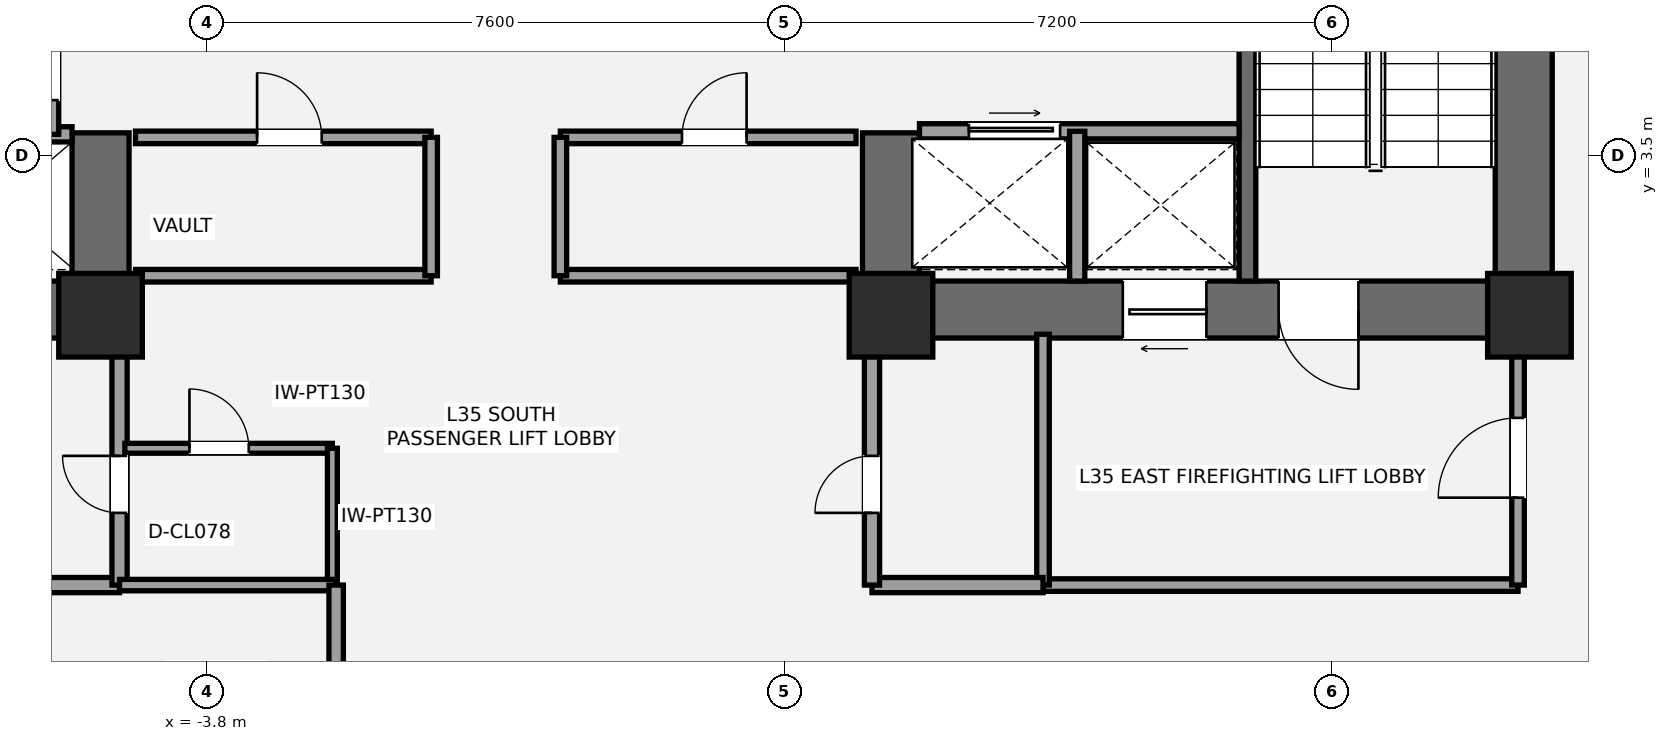
"""IFC4 building model, lengths in metres.
Left out: names, types, materials, properties, quantities, classifications, styles, units other than length and angle.
Written with IfcOpenShell. Run it as: python <this file> out.ifc"""

import sys

from ifc_helpers import new_model, si_unit, direction, frame, frame_2d, origin, origin_2d, place, context, subcontext, project, spatial, rectangle, extrude, element, fill, save


model = new_model("IFC4")
c1 = context("Model", 3, precision=1e-05, world=origin(), true_north=direction((0.0, 1.0)))
c2 = subcontext(c1, "Body", "Model", "MODEL_VIEW")
j1 = project(units=[si_unit("LENGTHUNIT", "METRE"), si_unit("PLANEANGLEUNIT", "RADIAN")], contexts=[c1])
p1 = place(None, origin())
s1 = spatial("IfcSite", under=j1, at=p1, CompositionType="ELEMENT")
p2 = place(p1, origin())
s2 = spatial("IfcBuilding", under=s1, at=p2, CompositionType="ELEMENT")
p3 = place(p2, frame((0.0, 0.0, 131.6)))
s3 = spatial("IfcBuildingStorey", under=s2, at=p3, CompositionType="ELEMENT", Elevation=131.6)
p4 = place(p3, frame((-4.825, 1.475, 0.0), z_axis=(0.0, 0.0, 1.0), x_axis=(-1.0, 0.0, 0.0)))
e1 = element("IfcWall", 1, at=p4, inside=s3, PredefinedType="SHEAR", context=c2, shape_type="SweptSolid", body=[
    extrude(rectangle(XDim=9.075, YDim=0.75, at=frame_2d((4.538, 0.0))), origin(), (0.0, 0.0, 1.0), 3.5),
])
p5 = place(p4, frame((5.475, 0.0, 0.0)))
e2 = element("IfcOpeningElement", 2, at=p5, cuts=e1, PredefinedType="OPENING", context=c2, shape_type="SweptSolid", body=[
    extrude(rectangle(XDim=1.05, YDim=2.15, at=frame_2d((0.525, 1.075))), frame((0.0, 0.385, 0.0), z_axis=(0.0, -1.0, 0.0), x_axis=(1.0, 0.0, 0.0)), (0.0, 0.0, 1.0), 0.77),
])
p6 = place(p4, frame((3.805, 0.0, 0.0)))
e3 = element("IfcOpeningElement", 3, at=p6, cuts=e1, PredefinedType="OPENING", context=c2, shape_type="SweptSolid", body=[
    extrude(rectangle(XDim=1.1, YDim=2.2, at=frame_2d((0.55, 1.1))), frame((0.0, 0.385, 0.0), z_axis=(0.0, -1.0, 0.0), x_axis=(1.0, 0.0, 0.0)), (0.0, 0.0, 1.0), 0.77),
])
p7 = place(p3, frame((-5.2, 1.1, 0.0), z_axis=(0.0, 0.0, 1.0), x_axis=(0.0, 1.0, 0.0)))
e4 = element("IfcWall", 4, at=p7, inside=s3, PredefinedType="SHEAR", context=c2, shape_type="SweptSolid", body=[
    extrude(rectangle(XDim=2.7, YDim=0.75, at=frame_2d((1.35, 0.0))), origin(), (0.0, 0.0, 1.0), 3.5),
])
p8 = place(p3, frame((13.525, 1.1, 0.0), z_axis=(0.0, 0.0, 1.0), x_axis=(0.0, 1.0, 0.0)))
e5 = element("IfcWall", 5, at=p8, inside=s3, PredefinedType="SHEAR", context=c2, shape_type="SweptSolid", body=[
    extrude(rectangle(XDim=8.65, YDim=0.75, at=frame_2d((4.325, 0.0))), origin(), (0.0, 0.0, 1.0), 3.5),
])
p9 = place(p3, frame((13.9, 1.475, 0.0), z_axis=(0.0, 0.0, 1.0), x_axis=(-1.0, 0.0, 0.0)))
e6 = element("IfcWall", 6, at=p9, inside=s3, PredefinedType="SHEAR", context=c2, shape_type="SweptSolid", body=[
    extrude(rectangle(XDim=9.075, YDim=0.75, at=frame_2d((4.538, 0.0))), origin(), (0.0, 0.0, 1.0), 3.5),
])
p10 = place(p9, frame((2.55, 0.0, 0.0)))
e7 = element("IfcOpeningElement", 7, at=p10, cuts=e6, PredefinedType="OPENING", context=c2, shape_type="SweptSolid", body=[
    extrude(rectangle(XDim=1.05, YDim=2.15, at=frame_2d((0.525, 1.075))), frame((0.0, 0.385, 0.0), z_axis=(0.0, -1.0, 0.0), x_axis=(1.0, 0.0, 0.0)), (0.0, 0.0, 1.0), 0.77),
])
p11 = place(p9, frame((4.55, 0.0, 0.0)))
e8 = element("IfcOpeningElement", 8, at=p11, cuts=e6, PredefinedType="OPENING", context=c2, shape_type="SweptSolid", body=[
    extrude(rectangle(XDim=1.1, YDim=2.2, at=frame_2d((0.55, 1.1))), frame((0.0, 0.385, 0.0), z_axis=(0.0, -1.0, 0.0), x_axis=(1.0, 0.0, 0.0)), (0.0, 0.0, 1.0), 0.77),
])
p12 = place(p3, frame((5.2, 1.1, 0.0), z_axis=(0.0, 0.0, 1.0), x_axis=(0.0, 1.0, 0.0)))
e9 = element("IfcWall", 9, at=p12, inside=s3, PredefinedType="SHEAR", context=c2, shape_type="SweptSolid", body=[
    extrude(rectangle(XDim=2.7, YDim=0.75, at=frame_2d((1.35, 0.0))), origin(), (0.0, 0.0, 1.0), 3.5),
])
p13 = place(p3, frame((9.89, 1.85, 0.0), z_axis=(0.0, 0.0, 1.0), x_axis=(0.0, 1.0, 0.0)))
e10 = element("IfcWall", 10, at=p13, inside=s3, PredefinedType="SHEAR", context=c2, shape_type="SweptSolid", body=[
    extrude(rectangle(XDim=7.15, YDim=0.22, at=frame_2d((3.575, 0.0))), origin(), (0.0, 0.0, 1.0), 3.5),
])
for number, where, z_axis, x_axis in (
    (11, (-5.2, 1.4, 0.0), (0.0, 0.0, 1.0), (1.0, 0.0, 0.0)),
    (12, (5.2, 1.4, 0.0), (0.0, 0.0, 1.0), (1.0, 0.0, 0.0)),
    (13, (13.6, 1.4, 0.0), (0.0, 0.0, 1.0), (1.0, 0.0, 0.0)),
):
    element("IfcColumn", number, at=place(p3, frame(where, z_axis=z_axis, x_axis=x_axis)), inside=s3, PredefinedType="COLUMN", context=c2, shape_type="SweptSolid", body=[
        extrude(rectangle(XDim=1.1, YDim=1.1, at=origin_2d()), origin(), (0.0, 0.0, 1.0), 3.5),
    ])
p14 = place(p3, frame((-7.2, -2.15, 0.0), z_axis=(0.0, 0.0, 1.0), x_axis=(1.0, 0.0, 0.0)))
e14 = element("IfcWall", 14, at=p14, inside=s3, PredefinedType="SOLIDWALL", context=c2, shape_type="SweptSolid", body=[
    extrude(rectangle(XDim=2.25, YDim=0.2, at=frame_2d((1.125, 0.0))), origin(), (0.0, 0.0, 1.0), 3.26),
])
p15 = place(p3, frame((-4.95, -2.15, 0.0), z_axis=(0.0, 0.0, 1.0), x_axis=(0.0, 1.0, 0.0)))
e15 = element("IfcWall", 15, at=p15, inside=s3, PredefinedType="SOLIDWALL", context=c2, shape_type="SweptSolid", body=[
    extrude(rectangle(XDim=3.3, YDim=0.2, at=frame_2d((1.65, 0.0))), origin(), (0.0, 0.0, 1.0), 2.713),
])
p16 = place(p15, frame((0.95, 0.0, 0.0)))
e16 = element("IfcOpeningElement", 16, at=p16, cuts=e15, PredefinedType="OPENING", context=c2, shape_type="SweptSolid", body=[
    extrude(rectangle(XDim=0.75, YDim=2.1, at=frame_2d((0.375, 1.05))), frame((0.0, 0.11, 0.0), z_axis=(0.0, -1.0, 0.0), x_axis=(1.0, 0.0, 0.0)), (0.0, 0.0, 1.0), 0.22),
])
p17 = place(p3, frame((7.2, -2.15, 0.0), z_axis=(0.0, 0.0, 1.0), x_axis=(1.0, 0.0, 0.0)))
e17 = element("IfcWall", 17, at=p17, inside=s3, PredefinedType="PARTITIONING", context=c2, shape_type="SweptSolid", body=[
    extrude(rectangle(XDim=6.25, YDim=0.165, at=frame_2d((3.125, 0.0))), origin(), (0.0, 0.0, 1.0), 3.26),
])
p18 = place(p3, frame((7.2, -2.15, 0.0), z_axis=(0.0, 0.0, 1.0), x_axis=(0.0, 1.0, 0.0)))
e18 = element("IfcWall", 18, at=p18, inside=s3, PredefinedType="PARTITIONING", context=c2, shape_type="SweptSolid", body=[
    extrude(rectangle(XDim=3.3, YDim=0.165, at=frame_2d((1.65, 0.0))), origin(), (0.0, 0.0, 1.0), 3.26),
])
p19 = place(p3, frame((13.45, -2.15, 0.0), z_axis=(0.0, 0.0, 1.0), x_axis=(0.0, 1.0, 0.0)))
e19 = element("IfcWall", 19, at=p19, inside=s3, PredefinedType="PARTITIONING", context=c2, shape_type="SweptSolid", body=[
    extrude(rectangle(XDim=3.3, YDim=0.165, at=frame_2d((1.65, 0.0))), origin(), (0.0, 0.0, 1.0), 2.713),
])
p20 = place(p19, frame((1.15, 0.0, 0.0)))
e20 = element("IfcOpeningElement", 20, at=p20, cuts=e19, PredefinedType="OPENING", context=c2, shape_type="SweptSolid", body=[
    extrude(rectangle(XDim=1.05, YDim=2.15, at=frame_2d((0.525, 1.075))), frame((0.0, 0.093, 0.0), z_axis=(0.0, -1.0, 0.0), x_axis=(1.0, 0.0, 0.0)), (0.0, 0.0, 1.0), 0.185),
])
p21 = place(p3, frame((4.95, -2.15, 0.0), z_axis=(0.0, 0.0, 1.0), x_axis=(1.0, 0.0, 0.0)))
e21 = element("IfcWall", 21, at=p21, inside=s3, PredefinedType="SOLIDWALL", context=c2, shape_type="SweptSolid", body=[
    extrude(rectangle(XDim=2.25, YDim=0.2, at=frame_2d((1.125, 0.0))), origin(), (0.0, 0.0, 1.0), 3.26),
])
p22 = place(p3, frame((4.95, -2.15, 0.0), z_axis=(0.0, 0.0, 1.0), x_axis=(0.0, 1.0, 0.0)))
e22 = element("IfcWall", 22, at=p22, inside=s3, PredefinedType="SOLIDWALL", context=c2, shape_type="SweptSolid", body=[
    extrude(rectangle(XDim=3.3, YDim=0.2, at=frame_2d((1.65, 0.0))), origin(), (0.0, 0.0, 1.0), 3.26),
])
p23 = place(p22, frame((0.95, 0.0, 0.0)))
e23 = element("IfcOpeningElement", 23, at=p23, cuts=e22, PredefinedType="OPENING", context=c2, shape_type="SweptSolid", body=[
    extrude(rectangle(XDim=0.75, YDim=2.1, at=frame_2d((0.375, 1.05))), frame((0.0, 0.11, 0.0), z_axis=(0.0, -1.0, 0.0), x_axis=(1.0, 0.0, 0.0)), (0.0, 0.0, 1.0), 0.22),
])
p24 = place(p3, frame((-4.88, -0.35, 0.0), z_axis=(0.0, 0.0, 1.0), x_axis=(1.0, 0.0, 0.0)))
e24 = element("IfcWall", 24, at=p24, inside=s3, PredefinedType="PARTITIONING", context=c2, shape_type="SweptSolid", body=[
    extrude(rectangle(XDim=2.73, YDim=0.13, at=frame_2d((1.365, 0.0))), origin(), (0.0, 0.0, 1.0), 3.26),
])
p25 = place(p24, frame((0.85, 0.0, 0.0)))
e25 = element("IfcOpeningElement", 25, at=p25, cuts=e24, PredefinedType="OPENING", context=c2, shape_type="SweptSolid", body=[
    extrude(rectangle(XDim=0.78, YDim=2.1, at=frame_2d((0.39, 1.05))), frame((0.0, 0.075, 0.0), z_axis=(0.0, -1.0, 0.0), x_axis=(1.0, 0.0, 0.0)), (0.0, 0.0, 1.0), 0.15),
])
p26 = place(p3, frame((-2.15, -2.15, 0.0), z_axis=(0.0, 0.0, 1.0), x_axis=(0.0, 1.0, 0.0)))
e26 = element("IfcWall", 26, at=p26, inside=s3, PredefinedType="PARTITIONING", context=c2, shape_type="SweptSolid", body=[
    extrude(rectangle(XDim=1.8, YDim=0.13, at=frame_2d((0.9, 0.0))), origin(), (0.0, 0.0, 1.0), 2.713),
])
p27 = place(p3, frame((-9.78, 3.78, 0.0), z_axis=(0.0, 0.0, 1.0), x_axis=(1.0, 0.0, 0.0)))
e27 = element("IfcWall", 27, at=p27, inside=s3, PredefinedType="SOLIDWALL", context=c2, shape_type="SweptSolid", body=[
    extrude(rectangle(XDim=4.205, YDim=0.2, at=frame_2d((2.103, 0.0))), origin(), (0.0, 0.0, 1.0), 3.26),
])
p28 = place(p3, frame((-5.85, 3.78, 0.0), z_axis=(0.0, 0.0, 1.0), x_axis=(0.0, 1.0, 0.0)))
e28 = element("IfcWall", 28, at=p28, inside=s3, PredefinedType="SOLIDWALL", context=c2, shape_type="SweptSolid", body=[
    extrude(rectangle(XDim=1.69, YDim=0.2, at=frame_2d((0.845, 0.0))), origin(), (0.0, 0.0, 1.0), 3.26),
])
p29 = place(p28, frame((0.45, 0.0, 0.0)))
e29 = element("IfcOpeningElement", 29, at=p29, cuts=e28, PredefinedType="OPENING", context=c2, shape_type="SweptSolid", body=[
    extrude(rectangle(XDim=0.75, YDim=2.1, at=frame_2d((0.375, 1.05))), frame((0.0, 0.11, 0.0), z_axis=(0.0, -1.0, 0.0), x_axis=(1.0, 0.0, 0.0)), (0.0, 0.0, 1.0), 0.22),
])
p30 = place(p3, frame((5.575, 3.82, 0.0), z_axis=(0.0, 0.0, 1.0), x_axis=(1.0, 0.0, 0.0)))
e30 = element("IfcWall", 30, at=p30, inside=s3, PredefinedType="SOLIDWALL", context=c2, shape_type="SweptSolid", body=[
    extrude(rectangle(XDim=4.205, YDim=0.2, at=frame_2d((2.103, 0.0))), origin(), (0.0, 0.0, 1.0), 3.26),
])
p31 = place(p30, frame((0.65, 0.0, 0.0)))
e31 = element("IfcOpeningElement", 31, at=p31, cuts=e30, PredefinedType="OPENING", context=c2, shape_type="SweptSolid", body=[
    extrude(rectangle(XDim=1.2, YDim=2.2, at=frame_2d((0.6, 1.1))), frame((0.0, 0.11, 0.0), z_axis=(0.0, -1.0, 0.0), x_axis=(1.0, 0.0, 0.0)), (0.0, 0.0, 1.0), 0.22),
])
p32 = place(p3, frame((7.65, 1.85, 0.0), z_axis=(0.0, 0.0, 1.0), x_axis=(0.0, 1.0, 0.0)))
e32 = element("IfcWall", 32, at=p32, inside=s3, PredefinedType="SOLIDWALL", context=c2, shape_type="SweptSolid", body=[
    extrude(rectangle(XDim=1.97, YDim=0.2, at=frame_2d((0.985, 0.0))), origin(), (0.0, 0.0, 1.0), 3.26),
])
p33 = place(p3, frame((-4.74, 1.92, 0.0), z_axis=(0.0, 0.0, 1.0), x_axis=(1.0, 0.0, 0.0)))
e33 = element("IfcWall", 33, at=p33, inside=s3, PredefinedType="PARTITIONING", context=c2, shape_type="SweptSolid", body=[
    extrude(rectangle(XDim=3.89, YDim=0.165, at=frame_2d((1.945, 0.0))), origin(), (0.0, 0.0, 1.0), 2.25),
])
p34 = place(p3, frame((-4.74, 3.74, 0.0), z_axis=(0.0, 0.0, 1.0), x_axis=(1.0, 0.0, 0.0)))
e34 = element("IfcWall", 34, at=p34, inside=s3, PredefinedType="PARTITIONING", context=c2, shape_type="SweptSolid", body=[
    extrude(rectangle(XDim=3.89, YDim=0.165, at=frame_2d((1.945, 0.0))), origin(), (0.0, 0.0, 1.0), 3.26),
])
p35 = place(p34, frame((1.6, 0.0, 0.0)))
e35 = element("IfcOpeningElement", 35, at=p35, cuts=e34, PredefinedType="OPENING", context=c2, shape_type="SweptSolid", body=[
    extrude(rectangle(XDim=0.85, YDim=2.1, at=frame_2d((0.425, 1.05))), frame((0.0, 0.093, 0.0), z_axis=(0.0, -1.0, 0.0), x_axis=(1.0, 0.0, 0.0)), (0.0, 0.0, 1.0), 0.185),
])
p36 = place(p3, frame((-0.85, 1.92, 0.0), z_axis=(0.0, 0.0, 1.0), x_axis=(0.0, 1.0, 0.0)))
e36 = element("IfcWall", 36, at=p36, inside=s3, PredefinedType="PARTITIONING", context=c2, shape_type="SweptSolid", body=[
    extrude(rectangle(XDim=1.82, YDim=0.165, at=frame_2d((0.91, 0.0))), origin(), (0.0, 0.0, 1.0), 3.26),
])
p37 = place(p3, frame((0.85, 1.92, 0.0), z_axis=(0.0, 0.0, 1.0), x_axis=(1.0, 0.0, 0.0)))
e37 = element("IfcWall", 37, at=p37, inside=s3, PredefinedType="PARTITIONING", context=c2, shape_type="SweptSolid", body=[
    extrude(rectangle(XDim=3.89, YDim=0.165, at=frame_2d((1.945, 0.0))), origin(), (0.0, 0.0, 1.0), 2.25),
])
p38 = place(p3, frame((0.85, 3.74, 0.0), z_axis=(0.0, 0.0, 1.0), x_axis=(1.0, 0.0, 0.0)))
e38 = element("IfcWall", 38, at=p38, inside=s3, PredefinedType="PARTITIONING", context=c2, shape_type="SweptSolid", body=[
    extrude(rectangle(XDim=3.89, YDim=0.165, at=frame_2d((1.945, 0.0))), origin(), (0.0, 0.0, 1.0), 3.26),
])
p39 = place(p38, frame((1.6, 0.0, 0.0)))
e39 = element("IfcOpeningElement", 39, at=p39, cuts=e38, PredefinedType="OPENING", context=c2, shape_type="SweptSolid", body=[
    extrude(rectangle(XDim=0.85, YDim=2.1, at=frame_2d((0.425, 1.05))), frame((0.0, 0.093, 0.0), z_axis=(0.0, -1.0, 0.0), x_axis=(1.0, 0.0, 0.0)), (0.0, 0.0, 1.0), 0.185),
])
p40 = place(p3, frame((0.85, 1.92, 0.0), z_axis=(0.0, 0.0, 1.0), x_axis=(0.0, 1.0, 0.0)))
e40 = element("IfcWall", 40, at=p40, inside=s3, PredefinedType="PARTITIONING", context=c2, shape_type="SweptSolid", body=[
    extrude(rectangle(XDim=1.82, YDim=0.165, at=frame_2d((0.91, 0.0))), origin(), (0.0, 0.0, 1.0), 3.26),
])
p41 = place(p3, frame((-4.95, -2.15, 0.0), z_axis=(0.0, 0.0, 1.0), x_axis=(1.0, 0.0, 0.0)))
e41 = element("IfcWall", 41, at=p41, inside=s3, PredefinedType="PLUMBINGWALL", context=c2, shape_type="SweptSolid", body=[
    extrude(rectangle(XDim=2.85, YDim=0.15, at=frame_2d((1.425, 0.0))), origin(), (0.0, 0.0, 1.0), 2.713),
])
p42 = place(p3, frame((-2.1, -4.05, 0.0), z_axis=(0.0, 0.0, 1.0), x_axis=(0.0, 1.0, 0.0)))
e42 = element("IfcWall", 42, at=p42, inside=s3, PredefinedType="PLUMBINGWALL", context=c2, shape_type="SweptSolid", body=[
    extrude(rectangle(XDim=1.9, YDim=0.19, at=frame_2d((0.95, 0.0))), origin(), (0.0, 0.0, 1.0), 2.713),
])
p43 = place(p10, origin())
e43 = element("IfcDoor", 43, at=p43, inside=s3, OperationType="SINGLE_SWING_LEFT", PredefinedType="DOOR", context=c2, shape_type="SweptSolid", body=[
    extrude(rectangle(XDim=1.05, YDim=2.15, at=frame_2d((0.525, 1.075))), frame((0.0, 0.025, 0.0), z_axis=(0.0, -1.0, 0.0), x_axis=(1.0, 0.0, 0.0)), (0.0, 0.0, 1.0), 0.05),
])
fill(e7, e43)
p44 = place(p16, origin())
e44 = element("IfcDoor", 44, at=p44, inside=s3, OperationType="SINGLE_SWING_RIGHT", PredefinedType="DOOR", context=c2, shape_type="SweptSolid", body=[
    extrude(rectangle(XDim=0.75, YDim=2.1, at=frame_2d((0.375, 1.05))), frame((0.0, 0.025, 0.0), z_axis=(0.0, -1.0, 0.0), x_axis=(1.0, 0.0, 0.0)), (0.0, 0.0, 1.0), 0.05),
])
fill(e16, e44)
p45 = place(p20, origin())
e45 = element("IfcDoor", 45, at=p45, inside=s3, OperationType="SINGLE_SWING_LEFT", PredefinedType="DOOR", context=c2, shape_type="SweptSolid", body=[
    extrude(rectangle(XDim=1.05, YDim=2.15, at=frame_2d((0.525, 1.075))), frame((0.0, 0.025, 0.0), z_axis=(0.0, -1.0, 0.0), x_axis=(1.0, 0.0, 0.0)), (0.0, 0.0, 1.0), 0.05),
])
fill(e20, e45)
p46 = place(p23, origin())
e46 = element("IfcDoor", 46, at=p46, inside=s3, OperationType="SINGLE_SWING_LEFT", PredefinedType="DOOR", context=c2, shape_type="SweptSolid", body=[
    extrude(rectangle(XDim=0.75, YDim=2.1, at=frame_2d((0.375, 1.05))), frame((0.0, 0.025, 0.0), z_axis=(0.0, -1.0, 0.0), x_axis=(1.0, 0.0, 0.0)), (0.0, 0.0, 1.0), 0.05),
])
fill(e23, e46)
p47 = place(p25, origin())
e47 = element("IfcDoor", 47, at=p47, inside=s3, OperationType="SINGLE_SWING_LEFT", PredefinedType="DOOR", context=c2, shape_type="SweptSolid", body=[
    extrude(rectangle(XDim=0.78, YDim=2.1, at=frame_2d((0.39, 1.05))), frame((0.0, 0.025, 0.0), z_axis=(0.0, -1.0, 0.0), x_axis=(1.0, 0.0, 0.0)), (0.0, 0.0, 1.0), 0.05),
])
fill(e25, e47)
p48 = place(p29, origin())
e48 = element("IfcDoor", 48, at=p48, inside=s3, OperationType="SINGLE_SWING_RIGHT", PredefinedType="DOOR", context=c2, shape_type="SweptSolid", body=[
    extrude(rectangle(XDim=0.75, YDim=2.1, at=frame_2d((0.375, 1.05))), frame((0.0, 0.025, 0.0), z_axis=(0.0, -1.0, 0.0), x_axis=(1.0, 0.0, 0.0)), (0.0, 0.0, 1.0), 0.05),
])
fill(e29, e48)
p49 = place(p11, origin())
e49 = element("IfcDoor", 49, at=p49, inside=s3, OperationType="SLIDING_TO_LEFT", PredefinedType="DOOR", context=c2, shape_type="SweptSolid", body=[
    extrude(rectangle(XDim=1.1, YDim=2.2, at=frame_2d((0.55, 1.1))), frame((0.0, 0.025, 0.0), z_axis=(0.0, -1.0, 0.0), x_axis=(1.0, 0.0, 0.0)), (0.0, 0.0, 1.0), 0.05),
])
fill(e8, e49)
p50 = place(p31, origin())
e50 = element("IfcDoor", 50, at=p50, inside=s3, OperationType="SLIDING_TO_RIGHT", PredefinedType="DOOR", context=c2, shape_type="SweptSolid", body=[
    extrude(rectangle(XDim=1.2, YDim=2.2, at=frame_2d((0.6, 1.1))), frame((0.0, 0.025, 0.0), z_axis=(0.0, -1.0, 0.0), x_axis=(1.0, 0.0, 0.0)), (0.0, 0.0, 1.0), 0.05),
])
fill(e31, e50)
p51 = place(p35, origin())
e51 = element("IfcDoor", 51, at=p51, inside=s3, OperationType="SINGLE_SWING_LEFT", PredefinedType="DOOR", context=c2, shape_type="SweptSolid", body=[
    extrude(rectangle(XDim=0.85, YDim=2.1, at=frame_2d((0.425, 1.05))), frame((0.0, 0.025, 0.0), z_axis=(0.0, -1.0, 0.0), x_axis=(1.0, 0.0, 0.0)), (0.0, 0.0, 1.0), 0.05),
])
fill(e35, e51)
p52 = place(p39, origin())
e52 = element("IfcDoor", 52, at=p52, inside=s3, OperationType="SINGLE_SWING_RIGHT", PredefinedType="DOOR", context=c2, shape_type="SweptSolid", body=[
    extrude(rectangle(XDim=0.85, YDim=2.1, at=frame_2d((0.425, 1.05))), frame((0.0, 0.025, 0.0), z_axis=(0.0, -1.0, 0.0), x_axis=(1.0, 0.0, 0.0)), (0.0, 0.0, 1.0), 0.05),
])
fill(e39, e52)
save(model, sys.argv[1])
